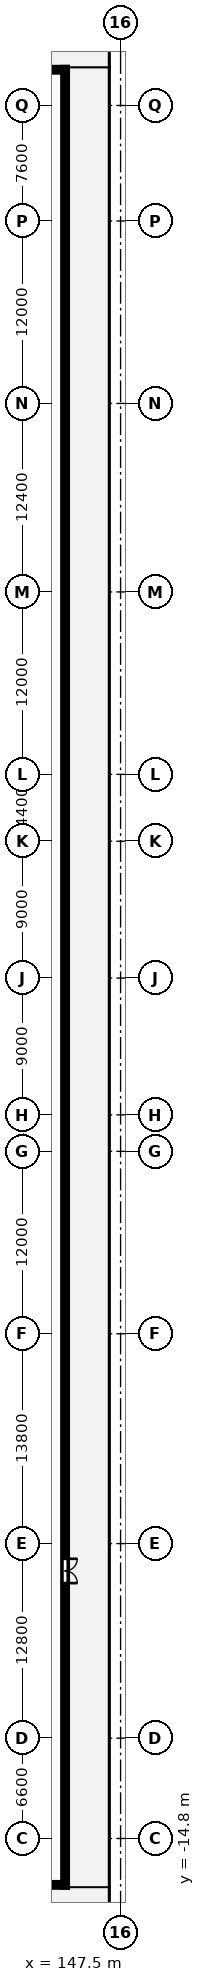
"""IFC4 building model, lengths in metres.
Left out: names, types, materials, properties, quantities, classifications, styles, units other than length and angle.
Written with IfcOpenShell. Run it as: python <this file> out.ifc"""

import sys

from ifc_helpers import new_model, si_unit, direction, frame, frame_2d, origin, place, context, subcontext, project, spatial, rectangle, extrude, element, fill, save


model = new_model("IFC4")
c1 = context("Model", 3, precision=1e-05, world=origin(), true_north=direction((0.0, 1.0)))
c2 = subcontext(c1, "Body", "Model", "MODEL_VIEW")
j1 = project(units=[si_unit("LENGTHUNIT", "METRE"), si_unit("PLANEANGLEUNIT", "RADIAN")], contexts=[c1])
p1 = place(None, origin())
s1 = spatial("IfcSite", under=j1, at=p1, CompositionType="ELEMENT")
p2 = place(p1, origin())
s2 = spatial("IfcBuilding", under=s1, at=p2, CompositionType="ELEMENT")
p3 = place(p2, frame((0.0, 0.0, 14.5)))
s3 = spatial("IfcBuildingStorey", under=s2, at=p3, CompositionType="ELEMENT", Elevation=14.5)
p4 = place(p3, frame((110.0, -17.85, 0.0), z_axis=(0.0, 0.0, 1.0), x_axis=(1.0, 0.0, 0.0)))
e1 = element("IfcWall", 1, at=p4, inside=s3, PredefinedType="STANDARD", context=c2, shape_type="SweptSolid", body=[
    extrude(rectangle(XDim=34.0, YDim=0.3, at=frame_2d((17.0, 0.0))), origin(), (0.0, 0.0, 1.0), 4.18),
])
p5 = place(p3, frame((144.0, 101.55, 0.0), z_axis=(0.0, 0.0, 1.0), x_axis=(-1.0, 0.0, 0.0)))
e2 = element("IfcWall", 2, at=p5, inside=s3, PredefinedType="STANDARD", context=c2, shape_type="SweptSolid", body=[
    extrude(rectangle(XDim=36.0, YDim=0.3, at=frame_2d((18.0, 0.0))), origin(), (0.0, 0.0, 1.0), 4.18),
])
p6 = place(p5, frame((10.0, 0.0, 0.0)))
e3 = element("IfcOpeningElement", 3, at=p6, cuts=e2, PredefinedType="OPENING", context=c2, shape_type="SweptSolid", body=[
    extrude(rectangle(XDim=1.6, YDim=2.2, at=frame_2d((0.8, 1.1))), frame((0.0, 0.16, 0.0), z_axis=(0.0, -1.0, 0.0), x_axis=(1.0, 0.0, 0.0)), (0.0, 0.0, 1.0), 0.32),
])
p7 = place(p3, frame((143.85, -18.0, 0.0), z_axis=(0.0, 0.0, 1.0), x_axis=(0.0, 1.0, 0.0)))
e4 = element("IfcWall", 4, at=p7, inside=s3, PredefinedType="STANDARD", context=c2, shape_type="SweptSolid", body=[
    extrude(rectangle(XDim=119.7, YDim=0.3, at=frame_2d((59.85, 0.0))), origin(), (0.0, 0.0, 1.0), 4.18),
])
p8 = place(p7, frame((20.0, 0.0, 0.0)))
e5 = element("IfcOpeningElement", 5, at=p8, cuts=e4, PredefinedType="OPENING", context=c2, shape_type="SweptSolid", body=[
    extrude(rectangle(XDim=1.6, YDim=2.2, at=frame_2d((0.8, 1.1))), frame((0.0, 0.16, 0.0), z_axis=(0.0, -1.0, 0.0), x_axis=(1.0, 0.0, 0.0)), (0.0, 0.0, 1.0), 0.32),
])
p9 = place(p8, frame((1.6, 0.0, 0.0), z_axis=(0.0, 0.0, 1.0), x_axis=(-1.0, 0.0, 0.0)))
e6 = element("IfcDoor", 6, at=p9, inside=s3, OperationType="DOUBLE_DOOR_SINGLE_SWING", PredefinedType="DOOR", context=c2, shape_type="SweptSolid", body=[
    extrude(rectangle(XDim=1.6, YDim=2.2, at=frame_2d((0.8, 1.1))), frame((0.0, 0.025, 0.0), z_axis=(0.0, -1.0, 0.0), x_axis=(1.0, 0.0, 0.0)), (0.0, 0.0, 1.0), 0.05),
])
fill(e5, e6)
save(model, sys.argv[1])
